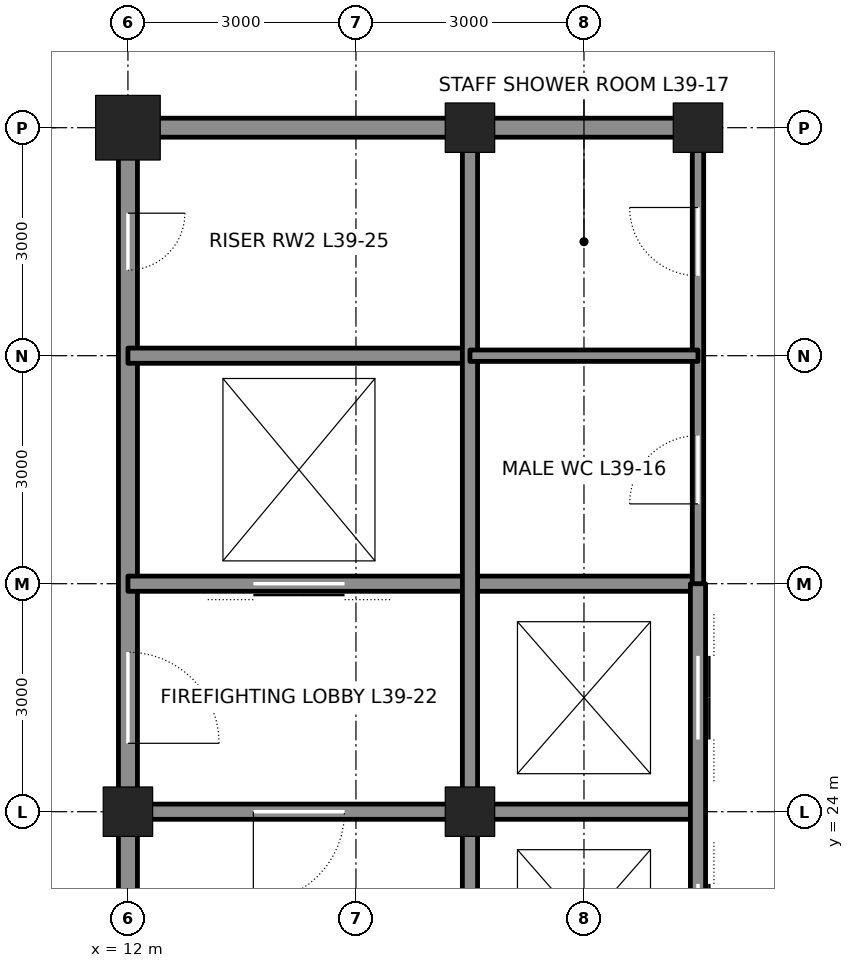
"""IFC4 building model, lengths in metres.
Left out: names, types, materials, properties, quantities, classifications, styles, units other than length and angle.
Written with IfcOpenShell. Run it as: python <this file> out.ifc"""

import sys

from ifc_helpers import new_model, si_unit, direction, frame, frame_2d, origin, origin_2d, place, context, subcontext, project, spatial, rectangle, hollow_rectangle, extrude, element, fill, save


model = new_model("IFC4")
c1 = context("Model", 3, precision=1e-05, world=origin(), true_north=direction((0.0, 1.0)))
c2 = subcontext(c1, "Body", "Model", "MODEL_VIEW")
j1 = project(units=[si_unit("LENGTHUNIT", "METRE"), si_unit("PLANEANGLEUNIT", "RADIAN")], contexts=[c1])
p1 = place(None, origin())
s1 = spatial("IfcSite", under=j1, at=p1, CompositionType="ELEMENT")
p2 = place(p1, origin())
s2 = spatial("IfcBuilding", under=s1, at=p2, CompositionType="ELEMENT")
p3 = place(p2, frame((0.0, 0.0, 180.0)))
s3 = spatial("IfcBuildingStorey", under=s2, at=p3, CompositionType="ELEMENT", Elevation=180.0)
p4 = place(p3, frame((12.0, 33.0, 0.0), z_axis=(0.0, 0.0, 1.0), x_axis=(1.0, 0.0, 0.0)))
e1 = element("IfcColumn", 1, at=p4, inside=s3, PredefinedType="COLUMN", context=c2, shape_type="SweptSolid", body=[
    extrude(hollow_rectangle(XDim=0.85, YDim=0.85, WallThickness=0.085, at=origin_2d()), origin(), (0.0, 0.0, 1.0), 4.5),
])
for number, where, z_axis, x_axis in (
    (2, (16.5, 33.0, 0.0), (0.0, 0.0, 1.0), (1.0, 0.0, 0.0)),
    (3, (19.5, 33.0, 0.0), (0.0, 0.0, 1.0), (1.0, 0.0, 0.0)),
    (4, (12.0, 24.0, 0.0), (0.0, 0.0, 1.0), (1.0, 0.0, 0.0)),
    (5, (16.5, 24.0, 0.0), (0.0, 0.0, 1.0), (1.0, 0.0, 0.0)),
):
    element("IfcColumn", number, at=place(p3, frame(where, z_axis=z_axis, x_axis=x_axis)), inside=s3, PredefinedType="COLUMN", context=c2, shape_type="SweptSolid", body=[
        extrude(hollow_rectangle(XDim=0.65, YDim=0.65, WallThickness=0.065, at=origin_2d()), origin(), (0.0, 0.0, 1.0), 4.5),
    ])
p5 = place(p3, frame((12.0, 21.25, 0.0), z_axis=(0.0, 0.0, 1.0), x_axis=(0.0, 1.0, 0.0)))
e6 = element("IfcWall", 6, at=p5, inside=s3, PredefinedType="SOLIDWALL", context=c2, shape_type="SweptSolid", body=[
    extrude(rectangle(XDim=2.5, YDim=0.25, at=frame_2d((1.25, 0.0))), origin(), (0.0, 0.0, 1.0), 3.413),
])
p6 = place(p3, frame((12.0, 24.25, 0.0), z_axis=(0.0, 0.0, 1.0), x_axis=(0.0, 1.0, 0.0)))
e7 = element("IfcWall", 7, at=p6, inside=s3, PredefinedType="SOLIDWALL", context=c2, shape_type="SweptSolid", body=[
    extrude(rectangle(XDim=8.5, YDim=0.25, at=frame_2d((4.25, 0.0))), origin(), (0.0, 0.0, 1.0), 3.413),
])
p7 = place(p6, frame((0.65, 0.0, 0.0)))
e8 = element("IfcOpeningElement", 8, at=p7, cuts=e7, PredefinedType="OPENING", context=c2, shape_type="SweptSolid", body=[
    extrude(rectangle(XDim=1.2, YDim=2.1, at=frame_2d((0.6, 1.05))), frame((0.0, 0.135, 0.0), z_axis=(0.0, -1.0, 0.0), x_axis=(1.0, 0.0, 0.0)), (0.0, 0.0, 1.0), 0.27),
])
p8 = place(p6, frame((6.875, 0.0, 0.0)))
e9 = element("IfcOpeningElement", 9, at=p8, cuts=e7, PredefinedType="OPENING", context=c2, shape_type="SweptSolid", body=[
    extrude(rectangle(XDim=0.75, YDim=2.1, at=frame_2d((0.375, 1.05))), frame((0.0, 0.135, 0.0), z_axis=(0.0, -1.0, 0.0), x_axis=(1.0, 0.0, 0.0)), (0.0, 0.0, 1.0), 0.27),
])
p9 = place(p3, frame((12.25, 24.0, 0.0), z_axis=(0.0, 0.0, 1.0), x_axis=(1.0, 0.0, 0.0)))
e10 = element("IfcWall", 10, at=p9, inside=s3, PredefinedType="SOLIDWALL", context=c2, shape_type="SweptSolid", body=[
    extrude(rectangle(XDim=4.0, YDim=0.2, at=frame_2d((2.0, 0.0))), origin(), (0.0, 0.0, 1.0), 3.39),
])
p10 = place(p9, frame((1.4, 0.0, 0.0)))
e11 = element("IfcOpeningElement", 11, at=p10, cuts=e10, PredefinedType="OPENING", context=c2, shape_type="SweptSolid", body=[
    extrude(rectangle(XDim=1.2, YDim=2.1, at=frame_2d((0.6, 1.05))), frame((0.0, 0.11, 0.0), z_axis=(0.0, -1.0, 0.0), x_axis=(1.0, 0.0, 0.0)), (0.0, 0.0, 1.0), 0.22),
])
p11 = place(p3, frame((16.75, 24.0, 0.0), z_axis=(0.0, 0.0, 1.0), x_axis=(1.0, 0.0, 0.0)))
e12 = element("IfcWall", 12, at=p11, inside=s3, PredefinedType="SOLIDWALL", context=c2, shape_type="SweptSolid", body=[
    extrude(rectangle(XDim=2.75, YDim=0.2, at=frame_2d((1.375, 0.0))), origin(), (0.0, 0.0, 1.0), 3.39),
])
p12 = place(p3, frame((12.0, 27.0, 0.0), z_axis=(0.0, 0.0, 1.0), x_axis=(1.0, 0.0, 0.0)))
e13 = element("IfcWall", 13, at=p12, inside=s3, PredefinedType="SOLIDWALL", context=c2, shape_type="SweptSolid", body=[
    extrude(rectangle(XDim=7.5, YDim=0.2, at=frame_2d((3.75, 0.0))), origin(), (0.0, 0.0, 1.0), 4.34),
])
p13 = place(p12, frame((1.65, 0.0, 0.0)))
e14 = element("IfcOpeningElement", 14, at=p13, cuts=e13, PredefinedType="OPENING", context=c2, shape_type="SweptSolid", body=[
    extrude(rectangle(XDim=1.2, YDim=2.1, at=frame_2d((0.6, 1.05))), frame((0.0, 0.11, 0.0), z_axis=(0.0, -1.0, 0.0), x_axis=(1.0, 0.0, 0.0)), (0.0, 0.0, 1.0), 0.22),
])
p14 = place(p3, frame((12.0, 30.0, 0.0), z_axis=(0.0, 0.0, 1.0), x_axis=(1.0, 0.0, 0.0)))
e15 = element("IfcWall", 15, at=p14, inside=s3, PredefinedType="SOLIDWALL", context=c2, shape_type="SweptSolid", body=[
    extrude(rectangle(XDim=4.5, YDim=0.2, at=frame_2d((2.25, 0.0))), origin(), (0.0, 0.0, 1.0), 4.34),
])
p15 = place(p3, frame((12.25, 33.0, 0.0), z_axis=(0.0, 0.0, 1.0), x_axis=(1.0, 0.0, 0.0)))
e16 = element("IfcWall", 16, at=p15, inside=s3, PredefinedType="SOLIDWALL", context=c2, shape_type="SweptSolid", body=[
    extrude(rectangle(XDim=4.0, YDim=0.25, at=frame_2d((2.0, 0.0))), origin(), (0.0, 0.0, 1.0), 3.481),
])
p16 = place(p3, frame((16.75, 33.0, 0.0), z_axis=(0.0, 0.0, 1.0), x_axis=(1.0, 0.0, 0.0)))
e17 = element("IfcWall", 17, at=p16, inside=s3, PredefinedType="SOLIDWALL", context=c2, shape_type="SweptSolid", body=[
    extrude(rectangle(XDim=2.5, YDim=0.25, at=frame_2d((1.25, 0.0))), origin(), (0.0, 0.0, 1.0), 3.481),
])
p17 = place(p3, frame((16.5, 21.25, 0.0), z_axis=(0.0, 0.0, 1.0), x_axis=(0.0, 1.0, 0.0)))
e18 = element("IfcWall", 18, at=p17, inside=s3, PredefinedType="SOLIDWALL", context=c2, shape_type="SweptSolid", body=[
    extrude(rectangle(XDim=2.5, YDim=0.2, at=frame_2d((1.25, 0.0))), origin(), (0.0, 0.0, 1.0), 3.413),
])
p18 = place(p3, frame((16.5, 24.25, 0.0), z_axis=(0.0, 0.0, 1.0), x_axis=(0.0, 1.0, 0.0)))
e19 = element("IfcWall", 19, at=p18, inside=s3, PredefinedType="SOLIDWALL", context=c2, shape_type="SweptSolid", body=[
    extrude(rectangle(XDim=8.5, YDim=0.2, at=frame_2d((4.25, 0.0))), origin(), (0.0, 0.0, 1.0), 3.413),
])
p19 = place(p3, frame((19.5, 15.0, 0.0), z_axis=(0.0, 0.0, 1.0), x_axis=(0.0, 1.0, 0.0)))
e20 = element("IfcWall", 20, at=p19, inside=s3, PredefinedType="SOLIDWALL", context=c2, shape_type="SweptSolid", body=[
    extrude(rectangle(XDim=12.0, YDim=0.2, at=frame_2d((6.0, 0.0))), origin(), (0.0, 0.0, 1.0), 3.365),
])
p20 = place(p19, frame((0.95, 0.0, 0.0)))
e21 = element("IfcOpeningElement", 21, at=p20, cuts=e20, PredefinedType="OPENING", context=c2, shape_type="SweptSolid", body=[
    extrude(rectangle(XDim=1.1, YDim=2.1, at=frame_2d((0.55, 1.05))), frame((0.0, 0.11, 0.0), z_axis=(0.0, -1.0, 0.0), x_axis=(1.0, 0.0, 0.0)), (0.0, 0.0, 1.0), 0.22),
])
p21 = place(p19, frame((3.95, 0.0, 0.0)))
e22 = element("IfcOpeningElement", 22, at=p21, cuts=e20, PredefinedType="OPENING", context=c2, shape_type="SweptSolid", body=[
    extrude(rectangle(XDim=1.1, YDim=2.1, at=frame_2d((0.55, 1.05))), frame((0.0, 0.11, 0.0), z_axis=(0.0, -1.0, 0.0), x_axis=(1.0, 0.0, 0.0)), (0.0, 0.0, 1.0), 0.22),
])
p22 = place(p19, frame((6.95, 0.0, 0.0)))
e23 = element("IfcOpeningElement", 23, at=p22, cuts=e20, PredefinedType="OPENING", context=c2, shape_type="SweptSolid", body=[
    extrude(rectangle(XDim=1.1, YDim=2.1, at=frame_2d((0.55, 1.05))), frame((0.0, 0.11, 0.0), z_axis=(0.0, -1.0, 0.0), x_axis=(1.0, 0.0, 0.0)), (0.0, 0.0, 1.0), 0.22),
])
p23 = place(p19, frame((9.95, 0.0, 0.0)))
e24 = element("IfcOpeningElement", 24, at=p23, cuts=e20, PredefinedType="OPENING", context=c2, shape_type="SweptSolid", body=[
    extrude(rectangle(XDim=1.1, YDim=2.1, at=frame_2d((0.55, 1.05))), frame((0.0, 0.11, 0.0), z_axis=(0.0, -1.0, 0.0), x_axis=(1.0, 0.0, 0.0)), (0.0, 0.0, 1.0), 0.22),
])
p24 = place(p3, frame((19.5, 27.0, 0.0), z_axis=(0.0, 0.0, 1.0), x_axis=(0.0, 1.0, 0.0)))
e25 = element("IfcWall", 25, at=p24, inside=s3, PredefinedType="PARTITIONING", context=c2, shape_type="SweptSolid", body=[
    extrude(rectangle(XDim=5.75, YDim=0.15, at=frame_2d((2.875, 0.0))), origin(), (0.0, 0.0, 1.0), 3.365),
])
p25 = place(p24, frame((1.05, 0.0, 0.0)))
e26 = element("IfcOpeningElement", 26, at=p25, cuts=e25, PredefinedType="OPENING", context=c2, shape_type="SweptSolid", body=[
    extrude(rectangle(XDim=0.9, YDim=2.1, at=frame_2d((0.45, 1.05))), frame((0.0, 0.085, 0.0), z_axis=(0.0, -1.0, 0.0), x_axis=(1.0, 0.0, 0.0)), (0.0, 0.0, 1.0), 0.17),
])
p26 = place(p24, frame((4.05, 0.0, 0.0)))
e27 = element("IfcOpeningElement", 27, at=p26, cuts=e25, PredefinedType="OPENING", context=c2, shape_type="SweptSolid", body=[
    extrude(rectangle(XDim=0.9, YDim=2.1, at=frame_2d((0.45, 1.05))), frame((0.0, 0.085, 0.0), z_axis=(0.0, -1.0, 0.0), x_axis=(1.0, 0.0, 0.0)), (0.0, 0.0, 1.0), 0.17),
])
p27 = place(p3, frame((16.5, 30.0, 0.0), z_axis=(0.0, 0.0, 1.0), x_axis=(1.0, 0.0, 0.0)))
e28 = element("IfcWall", 28, at=p27, inside=s3, PredefinedType="PARTITIONING", context=c2, shape_type="SweptSolid", body=[
    extrude(rectangle(XDim=3.0, YDim=0.15, at=frame_2d((1.5, 0.0))), origin(), (0.0, 0.0, 1.0), 4.34),
])
p28 = place(p10, frame((1.2, 0.0, 0.0), z_axis=(0.0, 0.0, 1.0), x_axis=(-1.0, 0.0, 0.0)))
e29 = element("IfcDoor", 29, at=p28, inside=s3, OperationType="SINGLE_SWING_RIGHT", PredefinedType="DOOR", context=c2, shape_type="SweptSolid", body=[
    extrude(rectangle(XDim=1.2, YDim=2.1, at=frame_2d((0.6, 1.05))), frame((0.0, 0.025, 0.0), z_axis=(0.0, -1.0, 0.0), x_axis=(1.0, 0.0, 0.0)), (0.0, 0.0, 1.0), 0.05),
])
fill(e11, e29)
p29 = place(p7, frame((1.2, 0.0, 0.0), z_axis=(0.0, 0.0, 1.0), x_axis=(-1.0, 0.0, 0.0)))
e30 = element("IfcDoor", 30, at=p29, inside=s3, OperationType="SINGLE_SWING_RIGHT", PredefinedType="DOOR", context=c2, shape_type="SweptSolid", body=[
    extrude(rectangle(XDim=1.2, YDim=2.1, at=frame_2d((0.6, 1.05))), frame((0.0, 0.025, 0.0), z_axis=(0.0, -1.0, 0.0), x_axis=(1.0, 0.0, 0.0)), (0.0, 0.0, 1.0), 0.05),
])
fill(e8, e30)
p30 = place(p13, origin())
e31 = element("IfcDoor", 31, at=p30, inside=s3, OperationType="DOUBLE_DOOR_SLIDING", PredefinedType="DOOR", context=c2, shape_type="SweptSolid", body=[
    extrude(rectangle(XDim=1.2, YDim=2.1, at=frame_2d((0.6, 1.05))), frame((0.0, 0.025, 0.0), z_axis=(0.0, -1.0, 0.0), x_axis=(1.0, 0.0, 0.0)), (0.0, 0.0, 1.0), 0.05),
])
fill(e14, e31)
p31 = place(p8, frame((0.75, 0.0, 0.0), z_axis=(0.0, 0.0, 1.0), x_axis=(-1.0, 0.0, 0.0)))
e32 = element("IfcDoor", 32, at=p31, inside=s3, OperationType="SINGLE_SWING_LEFT", PredefinedType="DOOR", context=c2, shape_type="SweptSolid", body=[
    extrude(rectangle(XDim=0.75, YDim=2.1, at=frame_2d((0.375, 1.05))), frame((0.0, 0.025, 0.0), z_axis=(0.0, -1.0, 0.0), x_axis=(1.0, 0.0, 0.0)), (0.0, 0.0, 1.0), 0.05),
])
fill(e9, e32)
p32 = place(p25, origin())
e33 = element("IfcDoor", 33, at=p32, inside=s3, OperationType="SINGLE_SWING_LEFT", PredefinedType="DOOR", context=c2, shape_type="SweptSolid", body=[
    extrude(rectangle(XDim=0.9, YDim=2.1, at=frame_2d((0.45, 1.05))), frame((0.0, 0.025, 0.0), z_axis=(0.0, -1.0, 0.0), x_axis=(1.0, 0.0, 0.0)), (0.0, 0.0, 1.0), 0.05),
])
fill(e26, e33)
p33 = place(p26, origin())
e34 = element("IfcDoor", 34, at=p33, inside=s3, OperationType="SINGLE_SWING_RIGHT", PredefinedType="DOOR", context=c2, shape_type="SweptSolid", body=[
    extrude(rectangle(XDim=0.9, YDim=2.1, at=frame_2d((0.45, 1.05))), frame((0.0, 0.025, 0.0), z_axis=(0.0, -1.0, 0.0), x_axis=(1.0, 0.0, 0.0)), (0.0, 0.0, 1.0), 0.05),
])
fill(e27, e34)
p34 = place(p22, origin())
e35 = element("IfcDoor", 35, at=p34, inside=s3, OperationType="DOUBLE_DOOR_SLIDING", PredefinedType="DOOR", context=c2, shape_type="SweptSolid", body=[
    extrude(rectangle(XDim=1.1, YDim=2.1, at=frame_2d((0.55, 1.05))), frame((0.0, 0.025, 0.0), z_axis=(0.0, -1.0, 0.0), x_axis=(1.0, 0.0, 0.0)), (0.0, 0.0, 1.0), 0.05),
])
fill(e23, e35)
p35 = place(p23, origin())
e36 = element("IfcDoor", 36, at=p35, inside=s3, OperationType="DOUBLE_DOOR_SLIDING", PredefinedType="DOOR", context=c2, shape_type="SweptSolid", body=[
    extrude(rectangle(XDim=1.1, YDim=2.1, at=frame_2d((0.55, 1.05))), frame((0.0, 0.025, 0.0), z_axis=(0.0, -1.0, 0.0), x_axis=(1.0, 0.0, 0.0)), (0.0, 0.0, 1.0), 0.05),
])
fill(e24, e36)
save(model, sys.argv[1])
